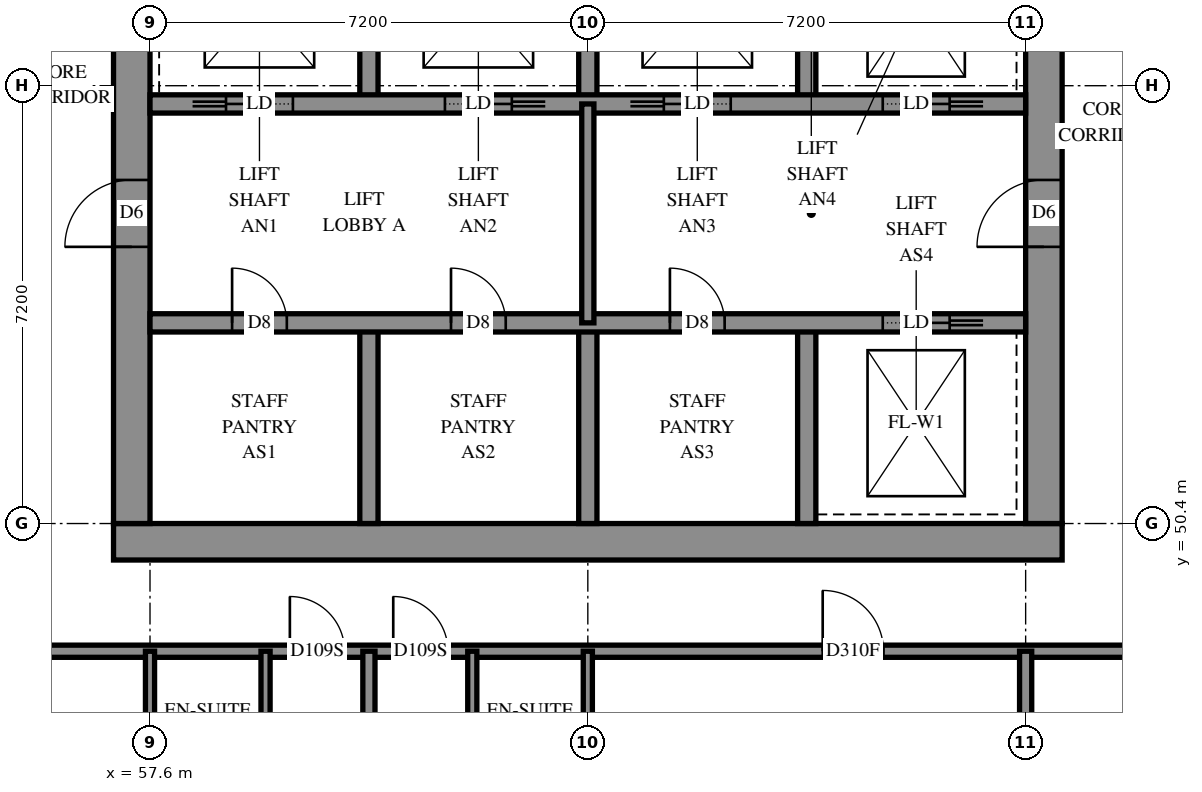
"""IFC4 building model, lengths in metres.
Left out: names, types, materials, properties, quantities, classifications, styles, units other than length and angle.
Written with IfcOpenShell. Run it as: python <this file> out.ifc"""

import sys

from ifc_helpers import new_model, si_unit, direction, frame, frame_2d, origin, place, context, subcontext, project, spatial, rectangle, extrude, element, fill, save


model = new_model("IFC4")
c1 = context("Model", 3, precision=1e-05, world=origin(), true_north=direction((0.0, 1.0)))
c2 = subcontext(c1, "Body", "Model", "MODEL_VIEW")
j1 = project(units=[si_unit("LENGTHUNIT", "METRE"), si_unit("PLANEANGLEUNIT", "RADIAN")], contexts=[c1])
p1 = place(None, origin())
s1 = spatial("IfcSite", under=j1, at=p1, CompositionType="ELEMENT")
p2 = place(p1, origin())
s2 = spatial("IfcBuilding", under=s1, at=p2, CompositionType="ELEMENT")
p3 = place(p2, frame((0.0, 0.0, 152.4)))
s3 = spatial("IfcBuildingStorey", under=s2, at=p3, CompositionType="ELEMENT", Elevation=152.4)
p4 = place(p3, frame((57.0, 50.1, -0.3), z_axis=(0.0, 0.0, 1.0), x_axis=(1.0, 0.0, 0.0)))
e1 = element("IfcWall", 1, at=p4, inside=s3, PredefinedType="SHEAR", context=c2, shape_type="SweptSolid", body=[
    extrude(rectangle(XDim=15.6, YDim=0.6, at=frame_2d((7.8, 0.0))), origin(), (0.0, 0.0, 1.0), 2.7),
])
p5 = place(p3, frame((57.3, 50.4, -0.3), z_axis=(0.0, 0.0, 1.0), x_axis=(0.0, 1.0, 0.0)))
e2 = element("IfcWall", 2, at=p5, inside=s3, PredefinedType="SHEAR", context=c2, shape_type="SweptSolid", body=[
    extrude(rectangle(XDim=14.4, YDim=0.6, at=frame_2d((7.2, 0.0))), origin(), (0.0, 0.0, 1.0), 2.7),
])
p6 = place(p5, frame((4.55, 0.0, 0.3)))
e3 = element("IfcOpeningElement", 3, at=p6, cuts=e2, PredefinedType="OPENING", context=c2, shape_type="SweptSolid", body=[
    extrude(rectangle(XDim=1.1, YDim=2.1, at=frame_2d((0.55, 1.05))), frame((0.0, 0.31, 0.0), z_axis=(0.0, -1.0, 0.0), x_axis=(1.0, 0.0, 0.0)), (0.0, 0.0, 1.0), 0.62),
])
p7 = place(p5, frame((11.35, 0.0, 0.3)))
e4 = element("IfcOpeningElement", 4, at=p7, cuts=e2, PredefinedType="OPENING", context=c2, shape_type="SweptSolid", body=[
    extrude(rectangle(XDim=1.1, YDim=2.1, at=frame_2d((0.55, 1.05))), frame((0.0, 0.31, 0.0), z_axis=(0.0, -1.0, 0.0), x_axis=(1.0, 0.0, 0.0)), (0.0, 0.0, 1.0), 0.62),
])
p8 = place(p3, frame((72.3, 50.4, -0.3), z_axis=(0.0, 0.0, 1.0), x_axis=(0.0, 1.0, 0.0)))
e5 = element("IfcWall", 5, at=p8, inside=s3, PredefinedType="SHEAR", context=c2, shape_type="SweptSolid", body=[
    extrude(rectangle(XDim=14.4, YDim=0.6, at=frame_2d((7.2, 0.0))), origin(), (0.0, 0.0, 1.0), 2.7),
])
p9 = place(p8, frame((4.55, 0.0, 0.3)))
e6 = element("IfcOpeningElement", 6, at=p9, cuts=e5, PredefinedType="OPENING", context=c2, shape_type="SweptSolid", body=[
    extrude(rectangle(XDim=1.1, YDim=2.1, at=frame_2d((0.55, 1.05))), frame((0.0, 0.31, 0.0), z_axis=(0.0, -1.0, 0.0), x_axis=(1.0, 0.0, 0.0)), (0.0, 0.0, 1.0), 0.62),
])
p10 = place(p8, frame((11.35, 0.0, 0.3)))
e7 = element("IfcOpeningElement", 7, at=p10, cuts=e5, PredefinedType="OPENING", context=c2, shape_type="SweptSolid", body=[
    extrude(rectangle(XDim=1.1, YDim=2.1, at=frame_2d((0.55, 1.05))), frame((0.0, 0.31, 0.0), z_axis=(0.0, -1.0, 0.0), x_axis=(1.0, 0.0, 0.0)), (0.0, 0.0, 1.0), 0.62),
])
for number, where, z_axis, x_axis in (
    (8, (61.2, 50.4, 0.0), (0.0, 0.0, 1.0), (0.0, 1.0, 0.0)),
    (9, (61.2, 57.3, 0.0), (0.0, 0.0, 1.0), (0.0, 1.0, 0.0)),
    (10, (64.8, 50.4, 0.0), (0.0, 0.0, 1.0), (0.0, 1.0, 0.0)),
    (11, (64.8, 57.3, 0.0), (0.0, 0.0, 1.0), (0.0, 1.0, 0.0)),
    (12, (68.4, 50.4, 0.0), (0.0, 0.0, 1.0), (0.0, 1.0, 0.0)),
    (13, (68.4, 57.3, 0.0), (0.0, 0.0, 1.0), (0.0, 1.0, 0.0)),
):
    element("IfcWall", number, at=place(p3, frame(where, z_axis=z_axis, x_axis=x_axis)), inside=s3, PredefinedType="SOLIDWALL", context=c2, shape_type="SweptSolid", body=[
        extrude(rectangle(XDim=3.3, YDim=0.3, at=frame_2d((1.65, 0.0))), origin(), (0.0, 0.0, 1.0), 3.1),
    ])
p11 = place(p3, frame((57.6, 53.7, 0.0), z_axis=(0.0, 0.0, 1.0), x_axis=(1.0, 0.0, 0.0)))
e14 = element("IfcWall", 14, at=p11, inside=s3, PredefinedType="SOLIDWALL", context=c2, shape_type="SweptSolid", body=[
    extrude(rectangle(XDim=14.4, YDim=0.3, at=frame_2d((7.2, 0.0))), origin(), (0.0, 0.0, 1.0), 3.1),
])
p12 = place(p11, frame((1.35, 0.0, 0.0)))
e15 = element("IfcOpeningElement", 15, at=p12, cuts=e14, PredefinedType="OPENING", context=c2, shape_type="SweptSolid", body=[
    extrude(rectangle(XDim=0.9, YDim=2.1, at=frame_2d((0.45, 1.05))), frame((0.0, 0.16, 0.0), z_axis=(0.0, -1.0, 0.0), x_axis=(1.0, 0.0, 0.0)), (0.0, 0.0, 1.0), 0.32),
])
p13 = place(p11, frame((4.95, 0.0, 0.0)))
e16 = element("IfcOpeningElement", 16, at=p13, cuts=e14, PredefinedType="OPENING", context=c2, shape_type="SweptSolid", body=[
    extrude(rectangle(XDim=0.9, YDim=2.1, at=frame_2d((0.45, 1.05))), frame((0.0, 0.16, 0.0), z_axis=(0.0, -1.0, 0.0), x_axis=(1.0, 0.0, 0.0)), (0.0, 0.0, 1.0), 0.32),
])
p14 = place(p11, frame((8.55, 0.0, 0.0)))
e17 = element("IfcOpeningElement", 17, at=p14, cuts=e14, PredefinedType="OPENING", context=c2, shape_type="SweptSolid", body=[
    extrude(rectangle(XDim=0.9, YDim=2.1, at=frame_2d((0.45, 1.05))), frame((0.0, 0.16, 0.0), z_axis=(0.0, -1.0, 0.0), x_axis=(1.0, 0.0, 0.0)), (0.0, 0.0, 1.0), 0.32),
])
p15 = place(p11, frame((12.05, 0.0, 0.0)))
e18 = element("IfcOpeningElement", 18, at=p15, cuts=e14, PredefinedType="OPENING", context=c2, shape_type="SweptSolid", body=[
    extrude(rectangle(XDim=1.1, YDim=2.1, at=frame_2d((0.55, 1.05))), frame((0.0, 0.16, 0.0), z_axis=(0.0, -1.0, 0.0), x_axis=(1.0, 0.0, 0.0)), (0.0, 0.0, 1.0), 0.32),
])
p16 = place(p3, frame((57.6, 57.3, 0.0), z_axis=(0.0, 0.0, 1.0), x_axis=(1.0, 0.0, 0.0)))
e19 = element("IfcWall", 19, at=p16, inside=s3, PredefinedType="SOLIDWALL", context=c2, shape_type="SweptSolid", body=[
    extrude(rectangle(XDim=14.4, YDim=0.3, at=frame_2d((7.2, 0.0))), origin(), (0.0, 0.0, 1.0), 3.1),
])
p17 = place(p16, frame((1.25, 0.0, 0.0)))
e20 = element("IfcOpeningElement", 20, at=p17, cuts=e19, PredefinedType="OPENING", context=c2, shape_type="SweptSolid", body=[
    extrude(rectangle(XDim=1.1, YDim=2.1, at=frame_2d((0.55, 1.05))), frame((0.0, 0.16, 0.0), z_axis=(0.0, -1.0, 0.0), x_axis=(1.0, 0.0, 0.0)), (0.0, 0.0, 1.0), 0.32),
])
p18 = place(p16, frame((4.85, 0.0, 0.0)))
e21 = element("IfcOpeningElement", 21, at=p18, cuts=e19, PredefinedType="OPENING", context=c2, shape_type="SweptSolid", body=[
    extrude(rectangle(XDim=1.1, YDim=2.1, at=frame_2d((0.55, 1.05))), frame((0.0, 0.16, 0.0), z_axis=(0.0, -1.0, 0.0), x_axis=(1.0, 0.0, 0.0)), (0.0, 0.0, 1.0), 0.32),
])
p19 = place(p16, frame((8.45, 0.0, 0.0)))
e22 = element("IfcOpeningElement", 22, at=p19, cuts=e19, PredefinedType="OPENING", context=c2, shape_type="SweptSolid", body=[
    extrude(rectangle(XDim=1.1, YDim=2.1, at=frame_2d((0.55, 1.05))), frame((0.0, 0.16, 0.0), z_axis=(0.0, -1.0, 0.0), x_axis=(1.0, 0.0, 0.0)), (0.0, 0.0, 1.0), 0.32),
])
p20 = place(p16, frame((12.05, 0.0, 0.0)))
e23 = element("IfcOpeningElement", 23, at=p20, cuts=e19, PredefinedType="OPENING", context=c2, shape_type="SweptSolid", body=[
    extrude(rectangle(XDim=1.1, YDim=2.1, at=frame_2d((0.55, 1.05))), frame((0.0, 0.16, 0.0), z_axis=(0.0, -1.0, 0.0), x_axis=(1.0, 0.0, 0.0)), (0.0, 0.0, 1.0), 0.32),
])
p21 = place(p3, frame((64.8, 53.7, 0.0), z_axis=(0.0, 0.0, 1.0), x_axis=(0.0, 1.0, 0.0)))
e24 = element("IfcWall", 24, at=p21, inside=s3, PredefinedType="PARTITIONING", context=c2, shape_type="SweptSolid", body=[
    extrude(rectangle(XDim=3.6, YDim=0.2, at=frame_2d((1.8, 0.0))), origin(), (0.0, 0.0, 1.0), 3.1),
])
p22 = place(p3, frame((55.5, 48.3, 0.0), z_axis=(0.0, 0.0, 1.0), x_axis=(1.0, 0.0, 0.0)))
e25 = element("IfcWall", 25, at=p22, inside=s3, PredefinedType="PARTITIONING", context=c2, shape_type="SweptSolid", body=[
    extrude(rectangle(XDim=18.974, YDim=0.2, at=frame_2d((9.487, 0.0))), origin(), (0.0, 0.0, 1.0), 3.1),
])
p23 = place(p22, frame((4.4, 0.0, 0.0)))
e26 = element("IfcOpeningElement", 26, at=p23, cuts=e25, PredefinedType="OPENING", context=c2, shape_type="SweptSolid", body=[
    extrude(rectangle(XDim=0.9, YDim=2.1, at=frame_2d((0.45, 1.05))), frame((0.0, 0.11, 0.0), z_axis=(0.0, -1.0, 0.0), x_axis=(1.0, 0.0, 0.0)), (0.0, 0.0, 1.0), 0.22),
])
p24 = place(p22, frame((6.1, 0.0, 0.0)))
e27 = element("IfcOpeningElement", 27, at=p24, cuts=e25, PredefinedType="OPENING", context=c2, shape_type="SweptSolid", body=[
    extrude(rectangle(XDim=0.9, YDim=2.1, at=frame_2d((0.45, 1.05))), frame((0.0, 0.11, 0.0), z_axis=(0.0, -1.0, 0.0), x_axis=(1.0, 0.0, 0.0)), (0.0, 0.0, 1.0), 0.22),
])
p25 = place(p22, frame((13.162, 0.0, 0.0)))
e28 = element("IfcOpeningElement", 28, at=p25, cuts=e25, PredefinedType="OPENING", context=c2, shape_type="SweptSolid", body=[
    extrude(rectangle(XDim=1.0, YDim=2.1, at=frame_2d((0.5, 1.05))), frame((0.0, 0.11, 0.0), z_axis=(0.0, -1.0, 0.0), x_axis=(1.0, 0.0, 0.0)), (0.0, 0.0, 1.0), 0.22),
])
p26 = place(p3, frame((61.2, 42.273, 0.0), z_axis=(0.0, 0.0, 1.0), x_axis=(0.0, 1.0, 0.0)))
e29 = element("IfcWall", 29, at=p26, inside=s3, PredefinedType="PARTITIONING", context=c2, shape_type="SweptSolid", body=[
    extrude(rectangle(XDim=6.027, YDim=0.2, at=frame_2d((3.014, 0.0))), origin(), (0.0, 0.0, 1.0), 3.1),
])
p27 = place(p3, frame((72.0, 43.65, 0.0), z_axis=(0.0, 0.0, 1.0), x_axis=(0.0, 1.0, 0.0)))
e30 = element("IfcWall", 30, at=p27, inside=s3, PredefinedType="PARTITIONING", context=c2, shape_type="SweptSolid", body=[
    extrude(rectangle(XDim=4.65, YDim=0.2, at=frame_2d((2.325, 0.0))), origin(), (0.0, 0.0, 1.0), 3.1),
])
for number, where, z_axis, x_axis in (
    (31, (59.5, 45.9, 0.0), (0.0, 0.0, 1.0), (0.0, 1.0, 0.0)),
    (32, (57.6, 45.9, 0.0), (0.0, 0.0, 1.0), (0.0, 1.0, 0.0)),
    (33, (62.9, 45.9, 0.0), (0.0, 0.0, 1.0), (0.0, 1.0, 0.0)),
    (34, (64.8, 45.9, 0.0), (0.0, 0.0, 1.0), (0.0, 1.0, 0.0)),
):
    element("IfcWall", number, at=place(p3, frame(where, z_axis=z_axis, x_axis=x_axis)), inside=s3, PredefinedType="PARTITIONING", context=c2, shape_type="SweptSolid", body=[
        extrude(rectangle(XDim=2.4, YDim=0.15, at=frame_2d((1.2, 0.0))), origin(), (0.0, 0.0, 1.0), 3.1),
    ])
p28 = place(p6, origin())
e35 = element("IfcDoor", 35, at=p28, inside=s3, OperationType="DOUBLE_DOOR_SINGLE_SWING", PredefinedType="DOOR", context=c2, shape_type="SweptSolid", body=[
    extrude(rectangle(XDim=1.1, YDim=2.1, at=frame_2d((0.55, 1.05))), frame((0.0, 0.025, 0.0), z_axis=(0.0, -1.0, 0.0), x_axis=(1.0, 0.0, 0.0)), (0.0, 0.0, 1.0), 0.05),
])
fill(e3, e35)
p29 = place(p9, origin())
e36 = element("IfcDoor", 36, at=p29, inside=s3, OperationType="DOUBLE_DOOR_SINGLE_SWING", PredefinedType="DOOR", context=c2, shape_type="SweptSolid", body=[
    extrude(rectangle(XDim=1.1, YDim=2.1, at=frame_2d((0.55, 1.05))), frame((0.0, 0.025, 0.0), z_axis=(0.0, -1.0, 0.0), x_axis=(1.0, 0.0, 0.0)), (0.0, 0.0, 1.0), 0.05),
])
fill(e6, e36)
p30 = place(p12, origin())
e37 = element("IfcDoor", 37, at=p30, inside=s3, OperationType="SINGLE_SWING_LEFT", PredefinedType="DOOR", context=c2, shape_type="SweptSolid", body=[
    extrude(rectangle(XDim=0.9, YDim=2.1, at=frame_2d((0.45, 1.05))), frame((0.0, 0.025, 0.0), z_axis=(0.0, -1.0, 0.0), x_axis=(1.0, 0.0, 0.0)), (0.0, 0.0, 1.0), 0.05),
])
fill(e15, e37)
p31 = place(p13, origin())
e38 = element("IfcDoor", 38, at=p31, inside=s3, OperationType="SINGLE_SWING_LEFT", PredefinedType="DOOR", context=c2, shape_type="SweptSolid", body=[
    extrude(rectangle(XDim=0.9, YDim=2.1, at=frame_2d((0.45, 1.05))), frame((0.0, 0.025, 0.0), z_axis=(0.0, -1.0, 0.0), x_axis=(1.0, 0.0, 0.0)), (0.0, 0.0, 1.0), 0.05),
])
fill(e16, e38)
p32 = place(p14, origin())
e39 = element("IfcDoor", 39, at=p32, inside=s3, OperationType="SINGLE_SWING_LEFT", PredefinedType="DOOR", context=c2, shape_type="SweptSolid", body=[
    extrude(rectangle(XDim=0.9, YDim=2.1, at=frame_2d((0.45, 1.05))), frame((0.0, 0.025, 0.0), z_axis=(0.0, -1.0, 0.0), x_axis=(1.0, 0.0, 0.0)), (0.0, 0.0, 1.0), 0.05),
])
fill(e17, e39)
p33 = place(p15, origin())
e40 = element("IfcDoor", 40, at=p33, inside=s3, OperationType="SLIDING_TO_RIGHT", PredefinedType="DOOR", context=c2, shape_type="SweptSolid", body=[
    extrude(rectangle(XDim=1.1, YDim=2.1, at=frame_2d((0.55, 1.05))), frame((0.0, 0.025, 0.0), z_axis=(0.0, -1.0, 0.0), x_axis=(1.0, 0.0, 0.0)), (0.0, 0.0, 1.0), 0.05),
])
fill(e18, e40)
p34 = place(p17, origin())
e41 = element("IfcDoor", 41, at=p34, inside=s3, OperationType="SLIDING_TO_LEFT", PredefinedType="DOOR", context=c2, shape_type="SweptSolid", body=[
    extrude(rectangle(XDim=1.1, YDim=2.1, at=frame_2d((0.55, 1.05))), frame((0.0, 0.025, 0.0), z_axis=(0.0, -1.0, 0.0), x_axis=(1.0, 0.0, 0.0)), (0.0, 0.0, 1.0), 0.05),
])
fill(e20, e41)
p35 = place(p18, origin())
e42 = element("IfcDoor", 42, at=p35, inside=s3, OperationType="SLIDING_TO_RIGHT", PredefinedType="DOOR", context=c2, shape_type="SweptSolid", body=[
    extrude(rectangle(XDim=1.1, YDim=2.1, at=frame_2d((0.55, 1.05))), frame((0.0, 0.025, 0.0), z_axis=(0.0, -1.0, 0.0), x_axis=(1.0, 0.0, 0.0)), (0.0, 0.0, 1.0), 0.05),
])
fill(e21, e42)
p36 = place(p19, origin())
e43 = element("IfcDoor", 43, at=p36, inside=s3, OperationType="SLIDING_TO_LEFT", PredefinedType="DOOR", context=c2, shape_type="SweptSolid", body=[
    extrude(rectangle(XDim=1.1, YDim=2.1, at=frame_2d((0.55, 1.05))), frame((0.0, 0.025, 0.0), z_axis=(0.0, -1.0, 0.0), x_axis=(1.0, 0.0, 0.0)), (0.0, 0.0, 1.0), 0.05),
])
fill(e22, e43)
p37 = place(p20, origin())
e44 = element("IfcDoor", 44, at=p37, inside=s3, OperationType="SLIDING_TO_RIGHT", PredefinedType="DOOR", context=c2, shape_type="SweptSolid", body=[
    extrude(rectangle(XDim=1.1, YDim=2.1, at=frame_2d((0.55, 1.05))), frame((0.0, 0.025, 0.0), z_axis=(0.0, -1.0, 0.0), x_axis=(1.0, 0.0, 0.0)), (0.0, 0.0, 1.0), 0.05),
])
fill(e23, e44)
p38 = place(p23, origin())
e45 = element("IfcDoor", 45, at=p38, inside=s3, OperationType="SINGLE_SWING_LEFT", PredefinedType="DOOR", context=c2, shape_type="SweptSolid", body=[
    extrude(rectangle(XDim=0.9, YDim=2.1, at=frame_2d((0.45, 1.05))), frame((0.0, 0.025, 0.0), z_axis=(0.0, -1.0, 0.0), x_axis=(1.0, 0.0, 0.0)), (0.0, 0.0, 1.0), 0.05),
])
fill(e26, e45)
p39 = place(p24, origin())
e46 = element("IfcDoor", 46, at=p39, inside=s3, OperationType="SINGLE_SWING_RIGHT", PredefinedType="DOOR", context=c2, shape_type="SweptSolid", body=[
    extrude(rectangle(XDim=0.9, YDim=2.1, at=frame_2d((0.45, 1.05))), frame((0.0, 0.025, 0.0), z_axis=(0.0, -1.0, 0.0), x_axis=(1.0, 0.0, 0.0)), (0.0, 0.0, 1.0), 0.05),
])
fill(e27, e46)
p40 = place(p25, origin())
e47 = element("IfcDoor", 47, at=p40, inside=s3, OperationType="SINGLE_SWING_LEFT", PredefinedType="DOOR", context=c2, shape_type="SweptSolid", body=[
    extrude(rectangle(XDim=1.0, YDim=2.1, at=frame_2d((0.5, 1.05))), frame((0.0, 0.025, 0.0), z_axis=(0.0, -1.0, 0.0), x_axis=(1.0, 0.0, 0.0)), (0.0, 0.0, 1.0), 0.05),
])
fill(e28, e47)
save(model, sys.argv[1])
